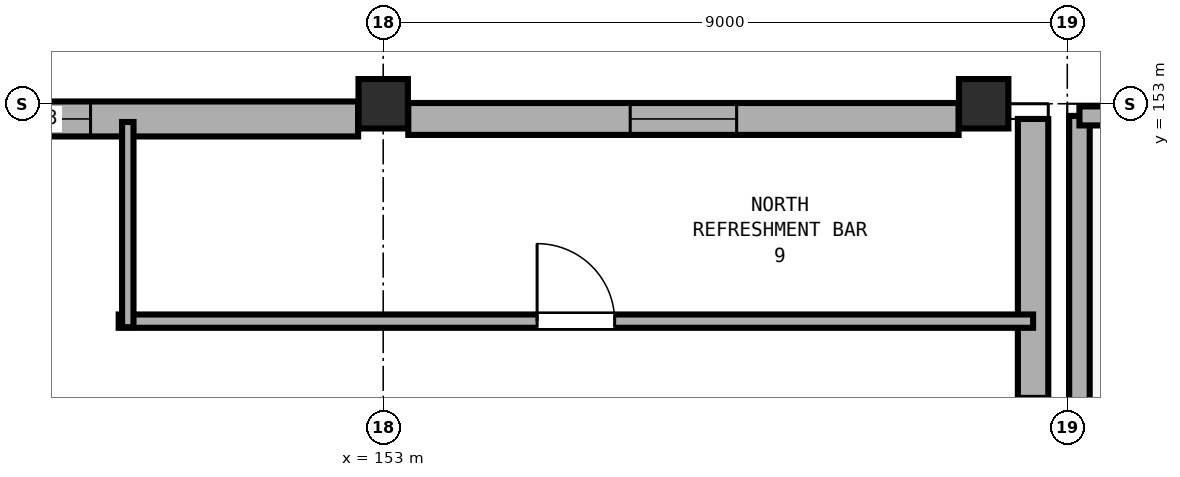
"""IFC4 building model, lengths in metres.
Left out: names, types, materials, properties, quantities, classifications, styles, units other than length and angle.
Written with IfcOpenShell. Run it as: python <this file> out.ifc"""

import sys

from ifc_helpers import new_model, si_unit, direction, frame, frame_2d, origin, origin_2d, place, context, subcontext, project, spatial, rectangle, extrude, element, fill, save


model = new_model("IFC4")
c1 = context("Model", 3, precision=1e-05, world=origin(), true_north=direction((0.0, 1.0)))
c2 = subcontext(c1, "Body", "Model", "MODEL_VIEW")
j1 = project(units=[si_unit("LENGTHUNIT", "METRE"), si_unit("PLANEANGLEUNIT", "RADIAN")], contexts=[c1])
p1 = place(None, origin())
s1 = spatial("IfcSite", under=j1, at=p1, CompositionType="ELEMENT")
p2 = place(p1, origin())
s2 = spatial("IfcBuilding", under=s1, at=p2, CompositionType="ELEMENT")
p3 = place(p2, frame((0.0, 0.0, 14.4)))
s3 = spatial("IfcBuildingStorey", under=s2, at=p3, CompositionType="ELEMENT", Elevation=14.4)
for number, where, z_axis, x_axis in (
    (1, (153.0, 153.0, 0.0), (0.0, 0.0, 1.0), (1.0, 0.0, 0.0)),
    (2, (160.9, 153.0, 0.0), (0.0, 0.0, 1.0), (1.0, 0.0, 0.0)),
):
    element("IfcColumn", number, at=place(p3, frame(where, z_axis=z_axis, x_axis=x_axis)), inside=s3, PredefinedType="COLUMN", context=c2, shape_type="SweptSolid", body=[
        extrude(rectangle(XDim=0.65, YDim=0.65, at=origin_2d()), origin(), (0.0, 0.0, 1.0), 4.8),
    ])
p4 = place(p3, frame((144.33, 152.8, 0.0), z_axis=(0.0, 0.0, 1.0), x_axis=(1.0, 0.0, 0.0)))
e3 = element("IfcWall", 3, at=p4, inside=s3, PredefinedType="SOLIDWALL", context=c2, shape_type="SweptSolid", body=[
    extrude(rectangle(XDim=8.34, YDim=0.46, at=frame_2d((4.17, 0.0))), origin(), (0.0, 0.0, 1.0), 3.58),
])
p5 = place(p4, frame((3.52, 0.0, 0.9)))
e4 = element("IfcOpeningElement", 4, at=p5, cuts=e3, PredefinedType="OPENING", context=c2, shape_type="SweptSolid", body=[
    extrude(rectangle(XDim=1.3, YDim=1.5, at=frame_2d((0.65, 0.75))), frame((0.0, 0.24, 0.0), z_axis=(0.0, -1.0, 0.0), x_axis=(1.0, 0.0, 0.0)), (0.0, 0.0, 1.0), 0.48),
])
p6 = place(p3, frame((153.33, 152.8, 0.0), z_axis=(0.0, 0.0, 1.0), x_axis=(1.0, 0.0, 0.0)))
e5 = element("IfcWall", 5, at=p6, inside=s3, PredefinedType="SOLIDWALL", context=c2, shape_type="SweptSolid", body=[
    extrude(rectangle(XDim=7.24, YDim=0.42, at=frame_2d((3.62, 0.0))), origin(), (0.0, 0.0, 1.0), 3.58),
])
p7 = place(p6, frame((2.92, 0.0, 0.9)))
e6 = element("IfcOpeningElement", 6, at=p7, cuts=e5, PredefinedType="OPENING", context=c2, shape_type="SweptSolid", body=[
    extrude(rectangle(XDim=1.4, YDim=1.55, at=frame_2d((0.7, 0.775))), frame((0.0, 0.22, 0.0), z_axis=(0.0, -1.0, 0.0), x_axis=(1.0, 0.0, 0.0)), (0.0, 0.0, 1.0), 0.44),
])
p8 = place(p3, frame((161.55, 152.8, 0.0), z_axis=(0.0, 0.0, 1.0), x_axis=(0.0, -1.0, 0.0)))
e7 = element("IfcWall", 7, at=p8, inside=s3, PredefinedType="SOLIDWALL", context=c2, shape_type="SweptSolid", body=[
    extrude(rectangle(XDim=8.8, YDim=0.4, at=frame_2d((4.4, 0.0))), origin(), (0.0, 0.0, 1.0), 3.58),
])
p9 = place(p8, frame((3.65, 0.0, 0.9)))
e8 = element("IfcOpeningElement", 8, at=p9, cuts=e7, PredefinedType="OPENING", context=c2, shape_type="SweptSolid", body=[
    extrude(rectangle(XDim=1.5, YDim=1.6, at=frame_2d((0.75, 0.8))), frame((0.0, 0.21, 0.0), z_axis=(0.0, -1.0, 0.0), x_axis=(1.0, 0.0, 0.0)), (0.0, 0.0, 1.0), 0.42),
])
p10 = place(p3, frame((162.16, 126.16, 0.0), z_axis=(0.0, 0.0, 1.0), x_axis=(0.0, 1.0, 0.0)))
e9 = element("IfcWall", 9, at=p10, inside=s3, PredefinedType="PARAPET", context=c2, shape_type="SweptSolid", body=[
    extrude(rectangle(XDim=26.68, YDim=0.27, at=frame_2d((13.34, 0.0))), origin(), (0.0, 0.0, 1.0), 0.65),
])
p11 = place(p3, frame((162.16, 152.84, 0.0), z_axis=(0.0, 0.0, 1.0), x_axis=(1.0, 0.0, 0.0)))
e10 = element("IfcWall", 10, at=p11, inside=s3, PredefinedType="PARAPET", context=c2, shape_type="SweptSolid", body=[
    extrude(rectangle(XDim=17.18, YDim=0.25, at=frame_2d((8.59, 0.0))), origin(), (0.0, 0.0, 1.0), 0.65),
])
p12 = place(p3, frame((149.52, 150.14, 0.0), z_axis=(0.0, 0.0, 1.0), x_axis=(1.0, 0.0, 0.0)))
e11 = element("IfcWall", 11, at=p12, inside=s3, PredefinedType="PARTITIONING", context=c2, shape_type="SweptSolid", body=[
    extrude(rectangle(XDim=12.03, YDim=0.175, at=frame_2d((6.015, 0.0))), origin(), (0.0, 0.0, 1.0), 3.56),
])
p13 = place(p12, frame((5.505, 0.0, 0.0)))
e12 = element("IfcOpeningElement", 12, at=p13, cuts=e11, PredefinedType="OPENING", context=c2, shape_type="SweptSolid", body=[
    extrude(rectangle(XDim=1.02, YDim=2.16, at=frame_2d((0.51, 1.08))), frame((0.0, 0.097, 0.0), z_axis=(0.0, -1.0, 0.0), x_axis=(1.0, 0.0, 0.0)), (0.0, 0.0, 1.0), 0.195),
])
p14 = place(p3, frame((149.64, 150.06, 0.0), z_axis=(0.0, 0.0, 1.0), x_axis=(0.0, 1.0, 0.0)))
e13 = element("IfcWall", 13, at=p14, inside=s3, PredefinedType="PARTITIONING", context=c2, shape_type="SweptSolid", body=[
    extrude(rectangle(XDim=2.7, YDim=0.15, at=frame_2d((1.35, 0.0))), origin(), (0.0, 0.0, 1.0), 3.56),
])
p15 = place(p5, origin())
e14 = element("IfcWindow", 14, at=p15, inside=s3, PartitioningType="SINGLE_PANEL", PredefinedType="WINDOW", context=c2, shape_type="SweptSolid", body=[
    extrude(rectangle(XDim=1.3, YDim=1.5, at=frame_2d((0.65, 0.75))), frame((0.0, 0.03, 0.0), z_axis=(0.0, -1.0, 0.0), x_axis=(1.0, 0.0, 0.0)), (0.0, 0.0, 1.0), 0.06),
])
fill(e4, e14)
p16 = place(p7, origin())
e15 = element("IfcWindow", 15, at=p16, inside=s3, PartitioningType="SINGLE_PANEL", PredefinedType="WINDOW", context=c2, shape_type="SweptSolid", body=[
    extrude(rectangle(XDim=1.4, YDim=1.55, at=frame_2d((0.7, 0.775))), frame((0.0, 0.03, 0.0), z_axis=(0.0, -1.0, 0.0), x_axis=(1.0, 0.0, 0.0)), (0.0, 0.0, 1.0), 0.06),
])
fill(e6, e15)
p17 = place(p9, origin())
e16 = element("IfcWindow", 16, at=p17, inside=s3, PartitioningType="SINGLE_PANEL", PredefinedType="WINDOW", context=c2, shape_type="SweptSolid", body=[
    extrude(rectangle(XDim=1.5, YDim=1.6, at=frame_2d((0.75, 0.8))), frame((0.0, 0.03, 0.0), z_axis=(0.0, -1.0, 0.0), x_axis=(1.0, 0.0, 0.0)), (0.0, 0.0, 1.0), 0.06),
])
fill(e8, e16)
p18 = place(p13, origin())
e17 = element("IfcDoor", 17, at=p18, inside=s3, OperationType="SINGLE_SWING_LEFT", PredefinedType="DOOR", context=c2, shape_type="SweptSolid", body=[
    extrude(rectangle(XDim=1.02, YDim=2.16, at=frame_2d((0.51, 1.08))), frame((0.0, 0.025, 0.0), z_axis=(0.0, -1.0, 0.0), x_axis=(1.0, 0.0, 0.0)), (0.0, 0.0, 1.0), 0.05),
])
fill(e12, e17)
save(model, sys.argv[1])
